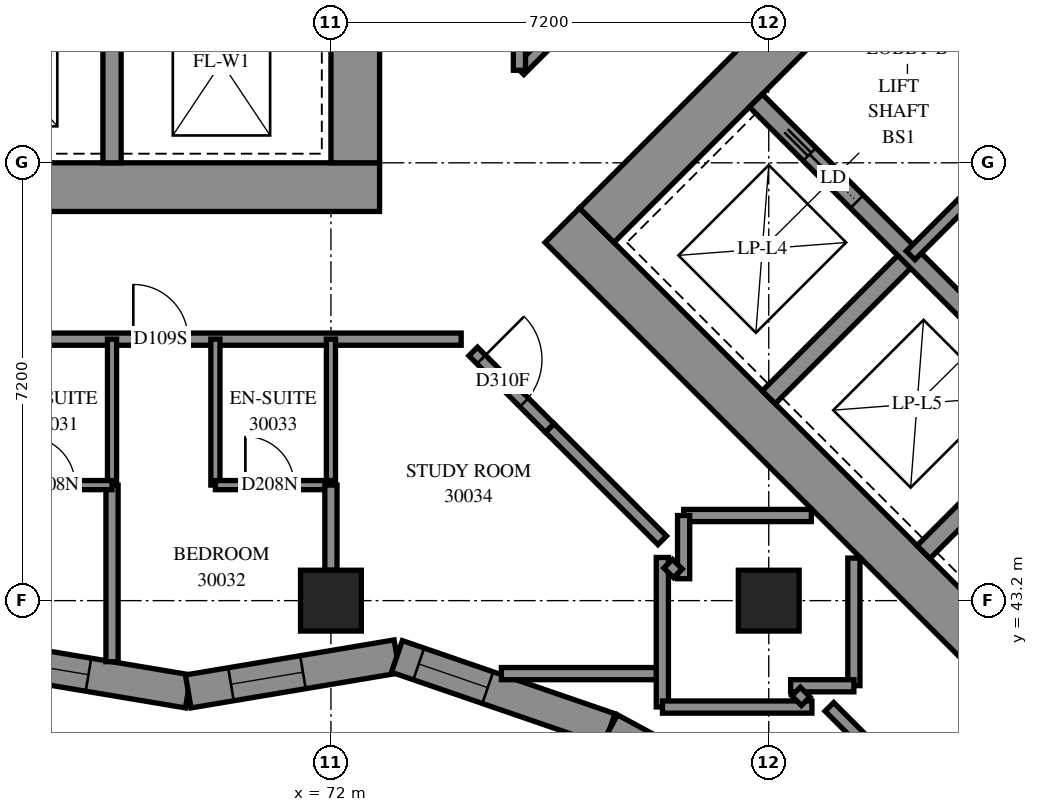
"""IFC4 building model, lengths in metres.
Left out: names, types, materials, properties, quantities, classifications, styles, units other than length and angle.
Written with IfcOpenShell. Run it as: python <this file> out.ifc"""

import sys

from ifc_helpers import new_model, si_unit, direction, frame, frame_2d, origin, origin_2d, place, context, subcontext, project, spatial, polyline, rectangle, outline, extrude, element, fill, save


model = new_model("IFC4")
c1 = context("Model", 3, precision=1e-05, world=origin(), true_north=direction((0.0, 1.0)))
c2 = subcontext(c1, "Body", "Model", "MODEL_VIEW")
j1 = project(units=[si_unit("LENGTHUNIT", "METRE"), si_unit("PLANEANGLEUNIT", "RADIAN")], contexts=[c1])
p1 = place(None, origin())
s1 = spatial("IfcSite", under=j1, at=p1, CompositionType="ELEMENT")
p2 = place(p1, origin())
s2 = spatial("IfcBuilding", under=s1, at=p2, CompositionType="ELEMENT")
p3 = place(p2, frame((0.0, 0.0, 111.8)))
s3 = spatial("IfcBuildingStorey", under=s2, at=p3, CompositionType="ELEMENT", Elevation=111.8)
for number, where, z_axis, x_axis in (
    (1, (72.0, 43.2, 0.0), (0.0, 0.0, 1.0), (1.0, 0.0, 0.0)),
    (2, (79.2, 43.2, 0.0), (0.0, 0.0, 1.0), (1.0, 0.0, 0.0)),
):
    element("IfcColumn", number, at=place(p3, frame(where, z_axis=z_axis, x_axis=x_axis)), inside=s3, PredefinedType="COLUMN", context=c2, shape_type="SweptSolid", body=[
        extrude(rectangle(XDim=1.0, YDim=1.0, at=origin_2d()), origin(), (0.0, 0.0, 1.0), 3.1),
    ])
p4 = place(p3, frame((56.8, 50.0, -0.3), z_axis=(0.0, 0.0, 1.0), x_axis=(1.0, 0.0, 0.0)))
e3 = element("IfcWall", 3, at=p4, inside=s3, PredefinedType="SHEAR", context=c2, shape_type="SweptSolid", body=[
    extrude(rectangle(XDim=16.0, YDim=0.8, at=frame_2d((8.0, 0.0))), origin(), (0.0, 0.0, 1.0), 2.7),
])
p5 = place(p3, frame((72.4, 50.4, -0.3), z_axis=(0.0, 0.0, 1.0), x_axis=(0.0, 1.0, 0.0)))
e4 = element("IfcWall", 4, at=p5, inside=s3, PredefinedType="SHEAR", context=c2, shape_type="SweptSolid", body=[
    extrude(rectangle(XDim=14.4, YDim=0.8, at=frame_2d((7.2, 0.0))), origin(), (0.0, 0.0, 1.0), 2.7),
])
p6 = place(p5, frame((4.55, 0.0, 0.3)))
e5 = element("IfcOpeningElement", 5, at=p6, cuts=e4, PredefinedType="OPENING", context=c2, shape_type="SweptSolid", body=[
    extrude(rectangle(XDim=1.1, YDim=2.1, at=frame_2d((0.55, 1.05))), frame((0.0, 0.41, 0.0), z_axis=(0.0, -1.0, 0.0), x_axis=(1.0, 0.0, 0.0)), (0.0, 0.0, 1.0), 0.82),
])
p7 = place(p5, frame((11.35, 0.0, 0.3)))
e6 = element("IfcOpeningElement", 6, at=p7, cuts=e4, PredefinedType="OPENING", context=c2, shape_type="SweptSolid", body=[
    extrude(rectangle(XDim=1.1, YDim=2.1, at=frame_2d((0.55, 1.05))), frame((0.0, 0.41, 0.0), z_axis=(0.0, -1.0, 0.0), x_axis=(1.0, 0.0, 0.0)), (0.0, 0.0, 1.0), 0.82),
])
p8 = place(p3, frame((68.4, 50.4, 0.0), z_axis=(0.0, 0.0, 1.0), x_axis=(0.0, 1.0, 0.0)))
e7 = element("IfcWall", 7, at=p8, inside=s3, PredefinedType="SOLIDWALL", context=c2, shape_type="SweptSolid", body=[
    extrude(rectangle(XDim=3.3, YDim=0.3, at=frame_2d((1.65, 0.0))), origin(), (0.0, 0.0, 1.0), 3.1),
])
p9 = place(p3, frame((75.806, 49.373, -0.3), z_axis=(0.0, 0.0, 1.0), x_axis=(0.7071067812, -0.7071067812, 0.0)))
e8 = element("IfcWall", 8, at=p9, inside=s3, PredefinedType="SHEAR", context=c2, shape_type="SweptSolid", body=[
    extrude(rectangle(XDim=16.0, YDim=0.8, at=frame_2d((8.0, 0.0))), origin(), (0.0, 0.0, 1.0), 2.7),
])
p10 = place(p3, frame((76.372, 49.373, -0.3), z_axis=(0.0, 0.0, 1.0), x_axis=(0.7071067812, 0.7071067812, 0.0)))
e9 = element("IfcWall", 9, at=p10, inside=s3, PredefinedType="SHEAR", context=c2, shape_type="SweptSolid", body=[
    extrude(rectangle(XDim=14.4, YDim=0.8, at=frame_2d((7.2, 0.0))), origin(), (0.0, 0.0, 1.0), 2.7),
])
p11 = place(p10, frame((4.55, 0.0, 0.3)))
e10 = element("IfcOpeningElement", 10, at=p11, cuts=e9, PredefinedType="OPENING", context=c2, shape_type="SweptSolid", body=[
    extrude(rectangle(XDim=1.1, YDim=2.1, at=frame_2d((0.55, 1.05))), frame((0.0, 0.41, 0.0), z_axis=(0.0, -1.0, 0.0), x_axis=(1.0, 0.0, 0.0)), (0.0, 0.0, 1.0), 0.82),
])
p12 = place(p10, frame((11.35, 0.0, 0.3)))
e11 = element("IfcOpeningElement", 11, at=p12, cuts=e9, PredefinedType="OPENING", context=c2, shape_type="SweptSolid", body=[
    extrude(rectangle(XDim=1.1, YDim=2.1, at=frame_2d((0.55, 1.05))), frame((0.0, 0.41, 0.0), z_axis=(0.0, -1.0, 0.0), x_axis=(1.0, 0.0, 0.0)), (0.0, 0.0, 1.0), 0.82),
])
p13 = place(p3, frame((79.2, 46.544, 0.0), z_axis=(0.0, 0.0, 1.0), x_axis=(0.7071219326, 0.7070916295, 0.0)))
e12 = element("IfcWall", 12, at=p13, inside=s3, PredefinedType="SOLIDWALL", context=c2, shape_type="SweptSolid", body=[
    extrude(rectangle(XDim=3.3, YDim=0.3, at=frame_2d((1.65, 0.0))), origin(), (0.0, 0.0, 1.0), 3.1),
])
p14 = place(p3, frame((81.746, 43.999, 0.0), z_axis=(0.0, 0.0, 1.0), x_axis=(0.7071067812, 0.7071067812, 0.0)))
e13 = element("IfcWall", 13, at=p14, inside=s3, PredefinedType="SOLIDWALL", context=c2, shape_type="SweptSolid", body=[
    extrude(rectangle(XDim=3.3, YDim=0.3, at=frame_2d((1.65, 0.0))), origin(), (0.0, 0.0, 1.0), 3.1),
])
p15 = place(p3, frame((78.988, 51.423, 0.0), z_axis=(0.0, 0.0, 1.0), x_axis=(0.7071067812, -0.7071067812, 0.0)))
e14 = element("IfcWall", 14, at=p15, inside=s3, PredefinedType="SOLIDWALL", context=c2, shape_type="SweptSolid", body=[
    extrude(rectangle(XDim=14.4, YDim=0.3, at=frame_2d((7.2, 0.0))), origin(), (0.0, 0.0, 1.0), 3.1),
])
p16 = place(p15, frame((1.25, 0.0, 0.0)))
e15 = element("IfcOpeningElement", 15, at=p16, cuts=e14, PredefinedType="OPENING", context=c2, shape_type="SweptSolid", body=[
    extrude(rectangle(XDim=1.1, YDim=2.1, at=frame_2d((0.55, 1.05))), frame((0.0, 0.16, 0.0), z_axis=(0.0, -1.0, 0.0), x_axis=(1.0, 0.0, 0.0)), (0.0, 0.0, 1.0), 0.32),
])
p17 = place(p15, frame((4.85, 0.0, 0.0)))
e16 = element("IfcOpeningElement", 16, at=p17, cuts=e14, PredefinedType="OPENING", context=c2, shape_type="SweptSolid", body=[
    extrude(rectangle(XDim=1.1, YDim=2.1, at=frame_2d((0.55, 1.05))), frame((0.0, 0.16, 0.0), z_axis=(0.0, -1.0, 0.0), x_axis=(1.0, 0.0, 0.0)), (0.0, 0.0, 1.0), 0.32),
])
p18 = place(p15, frame((8.45, 0.0, 0.0)))
e17 = element("IfcOpeningElement", 17, at=p18, cuts=e14, PredefinedType="OPENING", context=c2, shape_type="SweptSolid", body=[
    extrude(rectangle(XDim=1.1, YDim=2.1, at=frame_2d((0.55, 1.05))), frame((0.0, 0.16, 0.0), z_axis=(0.0, -1.0, 0.0), x_axis=(1.0, 0.0, 0.0)), (0.0, 0.0, 1.0), 0.32),
])
p19 = place(p15, frame((12.05, 0.0, 0.0)))
e18 = element("IfcOpeningElement", 18, at=p19, cuts=e14, PredefinedType="OPENING", context=c2, shape_type="SweptSolid", body=[
    extrude(rectangle(XDim=1.1, YDim=2.1, at=frame_2d((0.55, 1.05))), frame((0.0, 0.16, 0.0), z_axis=(0.0, -1.0, 0.0), x_axis=(1.0, 0.0, 0.0)), (0.0, 0.0, 1.0), 0.32),
])
p20 = place(p3, frame((81.534, 53.969, 0.0), z_axis=(0.0, 0.0, 1.0), x_axis=(0.707103309, -0.7071102534, 0.0)))
e19 = element("IfcWall", 19, at=p20, inside=s3, PredefinedType="SOLIDWALL", context=c2, shape_type="SweptSolid", body=[
    extrude(rectangle(XDim=14.4, YDim=0.3, at=frame_2d((7.2, 0.0))), origin(), (0.0, 0.0, 1.0), 3.1),
])
p21 = place(p20, frame((12.05, 0.0, 0.0)))
e20 = element("IfcOpeningElement", 20, at=p21, cuts=e19, PredefinedType="OPENING", context=c2, shape_type="SweptSolid", body=[
    extrude(rectangle(XDim=1.1, YDim=2.1, at=frame_2d((0.55, 1.05))), frame((0.0, 0.16, 0.0), z_axis=(0.0, -1.0, 0.0), x_axis=(1.0, 0.0, 0.0)), (0.0, 0.0, 1.0), 0.32),
])
p22 = place(p3, frame((66.244, 42.279, 0.0), z_axis=(0.0, 0.0, 1.0), x_axis=(0.9862119159, -0.1654873316, 0.0)))
e21 = element("IfcWall", 21, at=p22, inside=s3, PredefinedType="SOLIDWALL", context=c2, shape_type="SweptSolid", body=[
    extrude(outline(polyline([(0.046, -0.275), (3.503, -0.275), (3.41, 0.275), (-0.046, 0.275), (0.046, -0.275)])), origin(), (0.0, 0.0, 1.0), 3.1),
])
p23 = place(p22, frame((0.593, 0.0, 0.5)))
e22 = element("IfcOpeningElement", 22, at=p23, cuts=e21, PredefinedType="OPENING", context=c2, shape_type="SweptSolid", body=[
    extrude(rectangle(XDim=1.2, YDim=2.45, at=frame_2d((0.6, 1.225))), frame((0.0, 0.285, 0.0), z_axis=(0.0, -1.0, 0.0), x_axis=(1.0, 0.0, 0.0)), (0.0, 0.0, 1.0), 0.57),
])
p24 = place(p3, frame((69.653, 41.707, 0.0), z_axis=(0.0, 0.0, 1.0), x_axis=(0.9862084709, 0.1655078606, 0.0)))
e23 = element("IfcWall", 23, at=p24, inside=s3, PredefinedType="SOLIDWALL", context=c2, shape_type="SweptSolid", body=[
    extrude(outline(polyline([(-0.046, -0.275), (3.41, -0.275), (3.55, 0.275), (0.046, 0.275), (-0.046, -0.275)])), origin(), (0.0, 0.0, 1.0), 3.1),
])
p25 = place(p24, frame((0.713, 0.0, 0.5)))
e24 = element("IfcOpeningElement", 24, at=p25, cuts=e23, PredefinedType="OPENING", context=c2, shape_type="SweptSolid", body=[
    extrude(rectangle(XDim=1.2, YDim=2.45, at=frame_2d((0.6, 1.225))), frame((0.0, 0.285, 0.0), z_axis=(0.0, -1.0, 0.0), x_axis=(1.0, 0.0, 0.0)), (0.0, 0.0, 1.0), 0.57),
])
p26 = place(p3, frame((73.085, 42.283, 0.0), z_axis=(0.0, 0.0, 1.0), x_axis=(0.9456660696, -0.3251394852, 0.0)))
e25 = element("IfcWall", 25, at=p26, inside=s3, PredefinedType="SOLIDWALL", context=c2, shape_type="SweptSolid", body=[
    extrude(outline(polyline([(0.07, -0.275), (3.675, -0.275), (3.72, 0.275), (-0.07, 0.275), (0.07, -0.275)])), origin(), (0.0, 0.0, 1.0), 3.1),
])
p27 = place(p26, frame((0.38, 0.0, 0.5)))
e26 = element("IfcOpeningElement", 26, at=p27, cuts=e25, PredefinedType="OPENING", context=c2, shape_type="SweptSolid", body=[
    extrude(rectangle(XDim=1.2, YDim=2.45, at=frame_2d((0.6, 1.225))), frame((0.0, 0.285, 0.0), z_axis=(0.0, -1.0, 0.0), x_axis=(1.0, 0.0, 0.0)), (0.0, 0.0, 1.0), 0.57),
])
p28 = place(p3, frame((76.581, 41.081, 0.0), z_axis=(0.0, 0.0, 1.0), x_axis=(0.8794967773, -0.475904842, 0.0)))
e27 = element("IfcWall", 27, at=p28, inside=s3, PredefinedType="SOLIDWALL", context=c2, shape_type="SweptSolid", body=[
    extrude(outline(polyline([(0.023, -0.275), (4.13, -0.275), (4.251, 0.275), (-0.023, 0.275), (0.023, -0.275)])), origin(), (0.0, 0.0, 1.0), 3.1),
])
p29 = place(p28, frame((0.729, 0.0, 0.5)))
e28 = element("IfcOpeningElement", 28, at=p29, cuts=e27, PredefinedType="OPENING", context=c2, shape_type="SweptSolid", body=[
    extrude(rectangle(XDim=1.2, YDim=2.45, at=frame_2d((0.6, 1.225))), frame((0.0, 0.285, 0.0), z_axis=(0.0, -1.0, 0.0), x_axis=(1.0, 0.0, 0.0)), (0.0, 0.0, 1.0), 0.57),
])
p30 = place(p28, frame((2.224, 0.0, 0.5)))
e29 = element("IfcOpeningElement", 29, at=p30, cuts=e27, PredefinedType="OPENING", context=c2, shape_type="SweptSolid", body=[
    extrude(rectangle(XDim=1.2, YDim=2.45, at=frame_2d((0.6, 1.225))), frame((0.0, 0.285, 0.0), z_axis=(0.0, -1.0, 0.0), x_axis=(1.0, 0.0, 0.0)), (0.0, 0.0, 1.0), 0.57),
])
p31 = place(p3, frame((81.534, 48.878, 0.0), z_axis=(0.0, 0.0, 1.0), x_axis=(0.707092892, 0.7071206701, 0.0)))
e30 = element("IfcWall", 30, at=p31, inside=s3, PredefinedType="PARTITIONING", context=c2, shape_type="SweptSolid", body=[
    extrude(rectangle(XDim=3.6, YDim=0.2, at=frame_2d((1.8, 0.0))), origin(), (0.0, 0.0, 1.0), 3.1),
])
p32 = place(p3, frame((54.7, 47.5, 0.0), z_axis=(0.0, 0.0, 1.0), x_axis=(1.0, 0.0, 0.0)))
e31 = element("IfcWall", 31, at=p32, inside=s3, PredefinedType="PARTITIONING", context=c2, shape_type="SweptSolid", body=[
    extrude(rectangle(XDim=19.442, YDim=0.2, at=frame_2d((9.721, 0.0))), origin(), (0.0, 0.0, 1.0), 3.1),
])
p33 = place(p32, frame((5.2, 0.0, 0.0)))
e32 = element("IfcOpeningElement", 32, at=p33, cuts=e31, PredefinedType="OPENING", context=c2, shape_type="SweptSolid", body=[
    extrude(rectangle(XDim=0.9, YDim=2.1, at=frame_2d((0.45, 1.05))), frame((0.0, 0.11, 0.0), z_axis=(0.0, -1.0, 0.0), x_axis=(1.0, 0.0, 0.0)), (0.0, 0.0, 1.0), 0.22),
])
p34 = place(p32, frame((8.757, 0.0, 0.0)))
e33 = element("IfcOpeningElement", 33, at=p34, cuts=e31, PredefinedType="OPENING", context=c2, shape_type="SweptSolid", body=[
    extrude(rectangle(XDim=0.9, YDim=2.1, at=frame_2d((0.45, 1.05))), frame((0.0, 0.11, 0.0), z_axis=(0.0, -1.0, 0.0), x_axis=(1.0, 0.0, 0.0)), (0.0, 0.0, 1.0), 0.22),
])
p35 = place(p32, frame((14.05, 0.0, 0.0)))
e34 = element("IfcOpeningElement", 34, at=p35, cuts=e31, PredefinedType="OPENING", context=c2, shape_type="SweptSolid", body=[
    extrude(rectangle(XDim=0.9, YDim=2.1, at=frame_2d((0.45, 1.05))), frame((0.0, 0.11, 0.0), z_axis=(0.0, -1.0, 0.0), x_axis=(1.0, 0.0, 0.0)), (0.0, 0.0, 1.0), 0.22),
])
p36 = place(p3, frame((80.197, 41.453, 0.0), z_axis=(0.0, 0.0, 1.0), x_axis=(0.7071067812, -0.7071067812, 0.0)))
e35 = element("IfcWall", 35, at=p36, inside=s3, PredefinedType="PARTITIONING", context=c2, shape_type="SweptSolid", body=[
    extrude(rectangle(XDim=6.488, YDim=0.2, at=frame_2d((3.244, 0.0))), origin(), (0.0, 0.0, 1.0), 3.1),
])
p37 = place(p3, frame((68.4, 42.196, 0.0), z_axis=(0.0, 0.0, 1.0), x_axis=(0.0, 1.0, 0.0)))
e36 = element("IfcWall", 36, at=p37, inside=s3, PredefinedType="PARTITIONING", context=c2, shape_type="SweptSolid", body=[
    extrude(rectangle(XDim=2.904, YDim=0.2, at=frame_2d((1.452, 0.0))), origin(), (0.0, 0.0, 1.0), 3.1),
])
p38 = place(p3, frame((75.102, 51.922, 0.0), z_axis=(0.0, 0.0, 1.0), x_axis=(0.7071067812, 0.7071067812, 0.0)))
e37 = element("IfcWall", 37, at=p38, inside=s3, PredefinedType="PARTITIONING", context=c2, shape_type="SweptSolid", body=[
    extrude(rectangle(XDim=2.797, YDim=0.2, at=frame_2d((1.399, 0.0))), origin(), (0.0, 0.0, 1.0), 3.1),
])
p39 = place(p3, frame((74.803, 42.0, 0.0), z_axis=(0.0, 0.0, 1.0), x_axis=(1.0, 0.0, 0.0)))
e38 = element("IfcWall", 38, at=p39, inside=s3, PredefinedType="PARTITIONING", context=c2, shape_type="SweptSolid", body=[
    extrude(rectangle(XDim=2.647, YDim=0.2, at=frame_2d((1.323, 0.0))), origin(), (0.0, 0.0, 1.0), 3.1),
])
p40 = place(p3, frame((75.598, 46.04, 0.0), z_axis=(0.0, 0.0, 1.0), x_axis=(0.7074891043, -0.7067242512, 0.0)))
e39 = element("IfcWall", 39, at=p40, inside=s3, PredefinedType="PARTITIONING", context=c2, shape_type="SweptSolid", body=[
    extrude(rectangle(XDim=2.615, YDim=0.2, at=frame_2d((1.308, 0.0))), origin(), (0.0, 0.0, 1.0), 3.1),
])
for number, where, z_axis, x_axis in (
    (40, (77.45, 41.452, 0.0), (0.0, 0.0, 1.0), (0.0, 1.0, 0.0)),
    (41, (77.452, 41.45, 0.0), (0.0, 0.0, 1.0), (1.0, 0.0, 0.0)),
):
    element("IfcWall", number, at=place(p3, frame(where, z_axis=z_axis, x_axis=x_axis)), inside=s3, PredefinedType="PARTITIONING", context=c2, shape_type="SweptSolid", body=[
        extrude(rectangle(XDim=2.458, YDim=0.2, at=frame_2d((1.229, 0.0))), origin(), (0.0, 0.0, 1.0), 3.1),
    ])
for number, where, z_axis, x_axis in (
    (42, (68.4, 45.1, 0.0), (0.0, 0.0, 1.0), (0.0, 1.0, 0.0)),
    (43, (70.1, 45.1, 0.0), (0.0, 0.0, 1.0), (0.0, 1.0, 0.0)),
    (44, (72.0, 45.1, 0.0), (0.0, 0.0, 1.0), (0.0, 1.0, 0.0)),
):
    element("IfcWall", number, at=place(p3, frame(where, z_axis=z_axis, x_axis=x_axis)), inside=s3, PredefinedType="PARTITIONING", context=c2, shape_type="SweptSolid", body=[
        extrude(rectangle(XDim=2.4, YDim=0.15, at=frame_2d((1.2, 0.0))), origin(), (0.0, 0.0, 1.0), 3.1),
    ])
for number, where, z_axis, x_axis in (
    (45, (77.802, 44.6, 0.0), (0.0, 0.0, 1.0), (1.0, 0.0, 0.0)),
    (46, (80.6, 41.802, 0.0), (0.0, 0.0, 1.0), (0.0, 1.0, 0.0)),
):
    element("IfcWall", number, at=place(p3, frame(where, z_axis=z_axis, x_axis=x_axis)), inside=s3, PredefinedType="PARTITIONING", context=c2, shape_type="SweptSolid", body=[
        extrude(rectangle(XDim=2.098, YDim=0.2, at=frame_2d((1.049, 0.0))), origin(), (0.0, 0.0, 1.0), 3.1),
    ])
p41 = place(p3, frame((75.1, 51.922, 0.0), z_axis=(0.0, 0.0, 1.0), x_axis=(0.0, 1.0, 0.0)))
e47 = element("IfcWall", 47, at=p41, inside=s3, PredefinedType="PARTITIONING", context=c2, shape_type="SweptSolid", body=[
    extrude(rectangle(XDim=1.978, YDim=0.2, at=frame_2d((0.989, 0.0))), origin(), (0.0, 0.0, 1.0), 3.1),
])
p42 = place(p3, frame((66.5, 45.1, 0.0), z_axis=(0.0, 0.0, 1.0), x_axis=(1.0, 0.0, 0.0)))
e48 = element("IfcWall", 48, at=p42, inside=s3, PredefinedType="PARTITIONING", context=c2, shape_type="SweptSolid", body=[
    extrude(rectangle(XDim=1.9, YDim=0.15, at=frame_2d((0.95, 0.0))), origin(), (0.0, 0.0, 1.0), 3.1),
])
p43 = place(p42, frame((0.493, 0.0, 0.0)))
e49 = element("IfcOpeningElement", 49, at=p43, cuts=e48, PredefinedType="OPENING", context=c2, shape_type="SweptSolid", body=[
    extrude(rectangle(XDim=0.8, YDim=2.1, at=frame_2d((0.4, 1.05))), frame((0.0, 0.085, 0.0), z_axis=(0.0, -1.0, 0.0), x_axis=(1.0, 0.0, 0.0)), (0.0, 0.0, 1.0), 0.17),
])
p44 = place(p3, frame((70.1, 45.1, 0.0), z_axis=(0.0, 0.0, 1.0), x_axis=(1.0, 0.0, 0.0)))
e50 = element("IfcWall", 50, at=p44, inside=s3, PredefinedType="PARTITIONING", context=c2, shape_type="SweptSolid", body=[
    extrude(rectangle(XDim=1.9, YDim=0.15, at=frame_2d((0.95, 0.0))), origin(), (0.0, 0.0, 1.0), 3.1),
])
p45 = place(p44, frame((0.493, 0.0, 0.0)))
e51 = element("IfcOpeningElement", 51, at=p45, cuts=e50, PredefinedType="OPENING", context=c2, shape_type="SweptSolid", body=[
    extrude(rectangle(XDim=0.8, YDim=2.1, at=frame_2d((0.4, 1.05))), frame((0.0, 0.085, 0.0), z_axis=(0.0, -1.0, 0.0), x_axis=(1.0, 0.0, 0.0)), (0.0, 0.0, 1.0), 0.17),
])
p46 = place(p3, frame((74.339, 47.297, 0.0), z_axis=(0.0, 0.0, 1.0), x_axis=(0.7071067812, -0.7071067812, 0.0)))
e52 = element("IfcWall", 52, at=p46, inside=s3, PredefinedType="PARTITIONING", context=c2, shape_type="SweptSolid", body=[
    extrude(rectangle(XDim=1.779, YDim=0.2, at=frame_2d((0.889, 0.0))), origin(), (0.0, 0.0, 1.0), 3.1),
])
p47 = place(p46, frame((0.186, 0.0, 0.0)))
e53 = element("IfcOpeningElement", 53, at=p47, cuts=e52, PredefinedType="OPENING", context=c2, shape_type="SweptSolid", body=[
    extrude(rectangle(XDim=1.0, YDim=2.1, at=frame_2d((0.5, 1.05))), frame((0.0, 0.11, 0.0), z_axis=(0.0, -1.0, 0.0), x_axis=(1.0, 0.0, 0.0)), (0.0, 0.0, 1.0), 0.22),
])
p48 = place(p3, frame((72.0, 43.7, 0.0), z_axis=(0.0, 0.0, 1.0), x_axis=(0.0, 1.0, 0.0)))
e54 = element("IfcWall", 54, at=p48, inside=s3, PredefinedType="PARTITIONING", context=c2, shape_type="SweptSolid", body=[
    extrude(rectangle(XDim=1.4, YDim=0.2, at=frame_2d((0.7, 0.0))), origin(), (0.0, 0.0, 1.0), 3.1),
])
for number, where, z_axis, x_axis in (
    (55, (77.8, 43.56, 0.0), (0.0, 0.0, 1.0), (0.0, 1.0, 0.0)),
    (56, (79.56, 41.8, 0.0), (0.0, 0.0, 1.0), (1.0, 0.0, 0.0)),
):
    element("IfcWall", number, at=place(p3, frame(where, z_axis=z_axis, x_axis=x_axis)), inside=s3, PredefinedType="PARTITIONING", context=c2, shape_type="SweptSolid", body=[
        extrude(rectangle(XDim=1.04, YDim=0.2, at=frame_2d((0.52, 0.0))), origin(), (0.0, 0.0, 1.0), 3.1),
    ])
for number, where, z_axis, x_axis in (
    (57, (79.649, 41.705, 0.0), (0.0, 0.0, 1.0), (0.707, -0.707, 0.0)),
    (58, (77.546, 43.808, 0.0), (0.0, 0.0, 1.0), (0.707, -0.707, 0.0)),
):
    element("IfcWall", number, at=place(p3, frame(where, z_axis=z_axis, x_axis=x_axis)), inside=s3, PredefinedType="PARTITIONING", context=c2, shape_type="SweptSolid", body=[
        extrude(rectangle(XDim=0.225, YDim=0.2, at=frame_2d((0.112, 0.0))), origin(), (0.0, 0.0, 1.0), 3.1),
    ])
p49 = place(p23, origin())
e59 = element("IfcWindow", 59, at=p49, inside=s3, PartitioningType="SINGLE_PANEL", PredefinedType="WINDOW", context=c2, shape_type="SweptSolid", body=[
    extrude(rectangle(XDim=1.2, YDim=2.45, at=frame_2d((0.6, 1.225))), frame((0.0, 0.155, 0.0), z_axis=(0.0, -1.0, 0.0), x_axis=(1.0, 0.0, 0.0)), (0.0, 0.0, 1.0), 0.06),
])
fill(e22, e59)
p50 = place(p25, origin())
e60 = element("IfcWindow", 60, at=p50, inside=s3, PartitioningType="SINGLE_PANEL", PredefinedType="WINDOW", context=c2, shape_type="SweptSolid", body=[
    extrude(rectangle(XDim=1.2, YDim=2.45, at=frame_2d((0.6, 1.225))), frame((0.0, 0.155, 0.0), z_axis=(0.0, -1.0, 0.0), x_axis=(1.0, 0.0, 0.0)), (0.0, 0.0, 1.0), 0.06),
])
fill(e24, e60)
p51 = place(p27, origin())
e61 = element("IfcWindow", 61, at=p51, inside=s3, PartitioningType="SINGLE_PANEL", PredefinedType="WINDOW", context=c2, shape_type="SweptSolid", body=[
    extrude(rectangle(XDim=1.2, YDim=2.45, at=frame_2d((0.6, 1.225))), frame((0.0, 0.155, 0.0), z_axis=(0.0, -1.0, 0.0), x_axis=(1.0, 0.0, 0.0)), (0.0, 0.0, 1.0), 0.06),
])
fill(e26, e61)
p52 = place(p16, origin())
e62 = element("IfcDoor", 62, at=p52, inside=s3, OperationType="SLIDING_TO_LEFT", PredefinedType="DOOR", context=c2, shape_type="SweptSolid", body=[
    extrude(rectangle(XDim=1.1, YDim=2.1, at=frame_2d((0.55, 1.05))), frame((0.0, 0.025, 0.0), z_axis=(0.0, -1.0, 0.0), x_axis=(1.0, 0.0, 0.0)), (0.0, 0.0, 1.0), 0.05),
])
fill(e15, e62)
p53 = place(p43, origin())
e63 = element("IfcDoor", 63, at=p53, inside=s3, OperationType="SINGLE_SWING_RIGHT", PredefinedType="DOOR", context=c2, shape_type="SweptSolid", body=[
    extrude(rectangle(XDim=0.8, YDim=2.1, at=frame_2d((0.4, 1.05))), frame((0.0, 0.025, 0.0), z_axis=(0.0, -1.0, 0.0), x_axis=(1.0, 0.0, 0.0)), (0.0, 0.0, 1.0), 0.05),
])
fill(e49, e63)
p54 = place(p35, origin())
e64 = element("IfcDoor", 64, at=p54, inside=s3, OperationType="SINGLE_SWING_RIGHT", PredefinedType="DOOR", context=c2, shape_type="SweptSolid", body=[
    extrude(rectangle(XDim=0.9, YDim=2.1, at=frame_2d((0.45, 1.05))), frame((0.0, 0.025, 0.0), z_axis=(0.0, -1.0, 0.0), x_axis=(1.0, 0.0, 0.0)), (0.0, 0.0, 1.0), 0.05),
])
fill(e34, e64)
p55 = place(p45, origin())
e65 = element("IfcDoor", 65, at=p55, inside=s3, OperationType="SINGLE_SWING_RIGHT", PredefinedType="DOOR", context=c2, shape_type="SweptSolid", body=[
    extrude(rectangle(XDim=0.8, YDim=2.1, at=frame_2d((0.4, 1.05))), frame((0.0, 0.025, 0.0), z_axis=(0.0, -1.0, 0.0), x_axis=(1.0, 0.0, 0.0)), (0.0, 0.0, 1.0), 0.05),
])
fill(e51, e65)
p56 = place(p47, origin())
e66 = element("IfcDoor", 66, at=p56, inside=s3, OperationType="SINGLE_SWING_LEFT", PredefinedType="DOOR", context=c2, shape_type="SweptSolid", body=[
    extrude(rectangle(XDim=1.0, YDim=2.1, at=frame_2d((0.5, 1.05))), frame((0.0, 0.025, 0.0), z_axis=(0.0, -1.0, 0.0), x_axis=(1.0, 0.0, 0.0)), (0.0, 0.0, 1.0), 0.05),
])
fill(e53, e66)
save(model, sys.argv[1])
